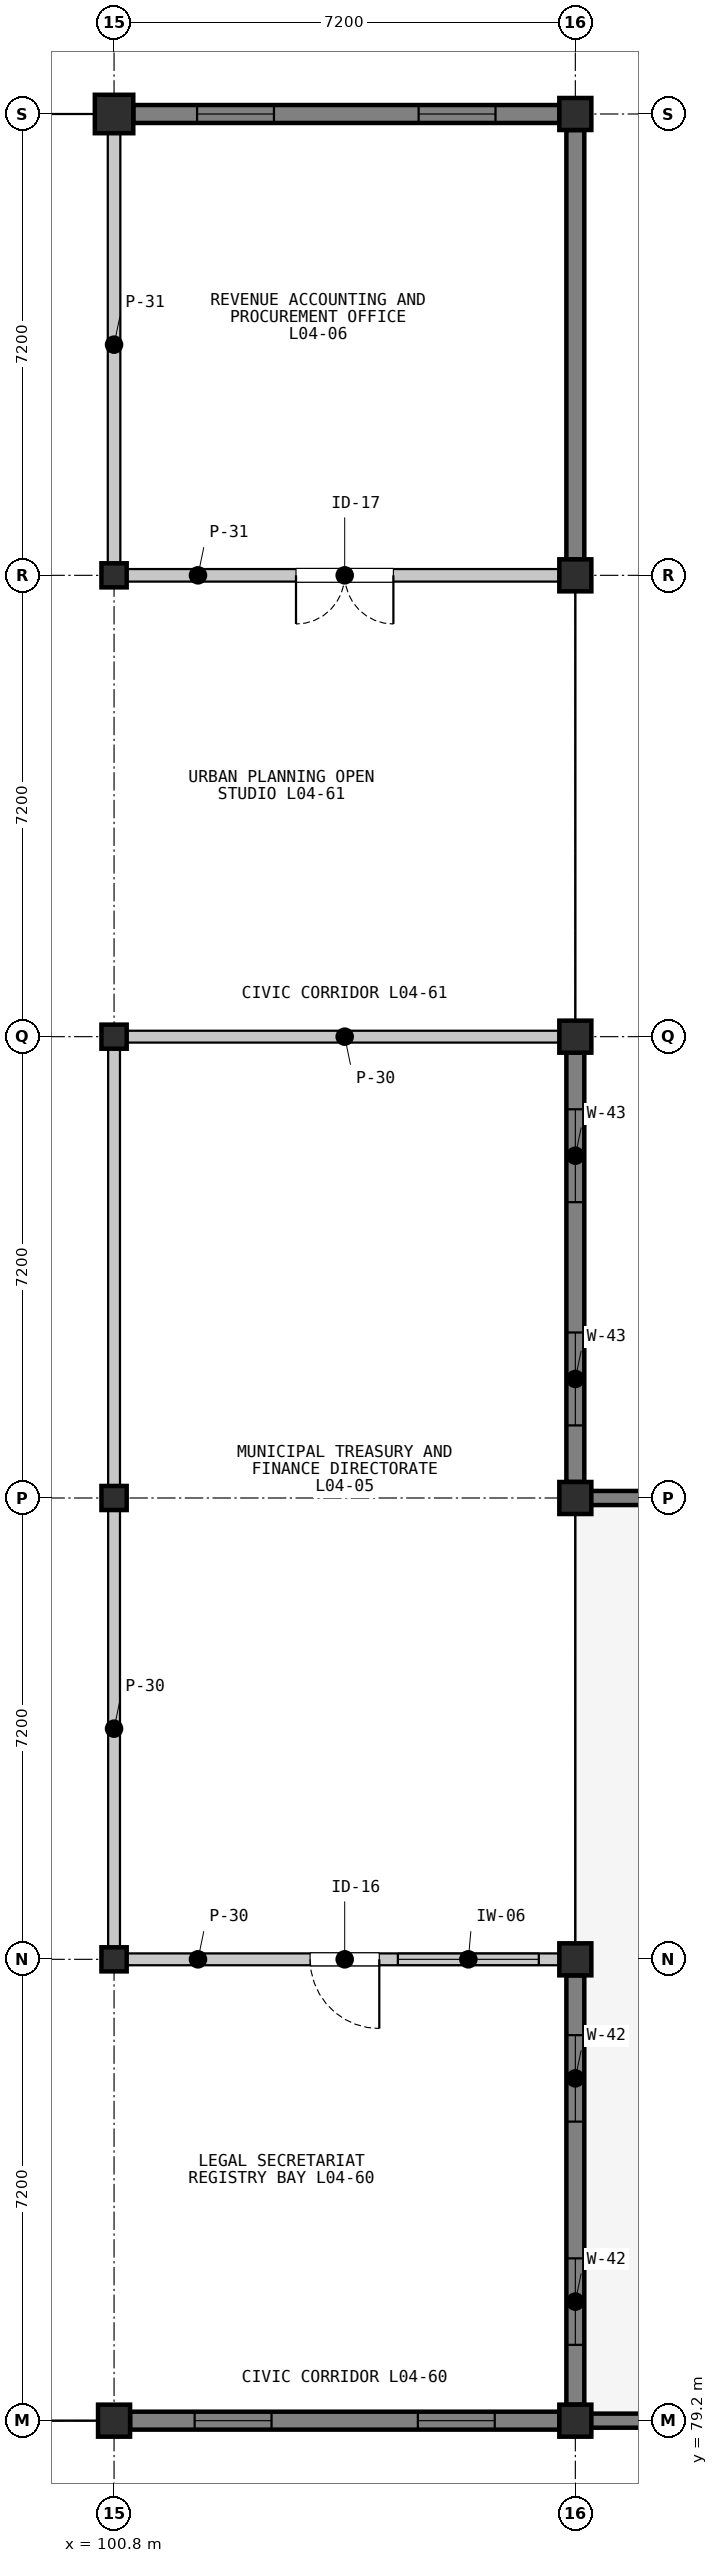
"""IFC4 building model, lengths in metres.
Left out: names, types, materials, properties, quantities, classifications, styles, units other than length and angle.
Written with IfcOpenShell. Run it as: python <this file> out.ifc"""

import sys

from ifc_helpers import new_model, si_unit, direction, frame, frame_2d, origin, origin_2d, place, context, subcontext, project, spatial, rectangle, i_section, extrude, element, fill, save


model = new_model("IFC4")
c1 = context("Model", 3, precision=1e-05, world=origin(), true_north=direction((0.0, 1.0)))
c2 = subcontext(c1, "Body", "Model", "MODEL_VIEW")
j1 = project(units=[si_unit("LENGTHUNIT", "METRE"), si_unit("PLANEANGLEUNIT", "RADIAN")], contexts=[c1])
p1 = place(None, origin())
s1 = spatial("IfcSite", under=j1, at=p1, CompositionType="ELEMENT")
p2 = place(p1, origin())
s2 = spatial("IfcBuilding", under=s1, at=p2, CompositionType="ELEMENT")
p3 = place(p2, frame((0.0, 0.0, 14.1)))
s3 = spatial("IfcBuildingStorey", under=s2, at=p3, CompositionType="ELEMENT", Elevation=14.1)
p4 = place(p3, frame((100.8, 79.2, 0.0), z_axis=(0.0, 0.0, 1.0), x_axis=(1.0, 0.0, 0.0)))
e1 = element("IfcColumn", 1, at=p4, inside=s3, PredefinedType="COLUMN", context=c2, shape_type="SweptSolid", body=[
    extrude(rectangle(XDim=0.5, YDim=0.5, at=origin_2d()), origin(), (0.0, 0.0, 1.0), 3.9),
])
for number, where, z_axis, x_axis in (
    (2, (100.8, 86.4, 0.0), (0.0, 0.0, 1.0), (1.0, 0.0, 0.0)),
    (3, (100.8, 93.6, 0.0), (0.0, 0.0, 1.0), (1.0, 0.0, 0.0)),
    (4, (100.8, 100.8, 0.0), (0.0, 0.0, 1.0), (1.0, 0.0, 0.0)),
    (5, (100.8, 108.0, 0.0), (0.0, 0.0, 1.0), (1.0, 0.0, 0.0)),
):
    element("IfcColumn", number, at=place(p3, frame(where, z_axis=z_axis, x_axis=x_axis)), inside=s3, PredefinedType="COLUMN", context=c2, shape_type="SweptSolid", body=[
        extrude(i_section(OverallWidth=0.394, OverallDepth=0.376, WebThickness=0.017, FlangeThickness=0.028, FilletRadius=0.015, at=origin_2d()), origin(), (0.0, 0.0, 1.0), 3.9),
    ])
p5 = place(p3, frame((100.8, 115.2, 0.0), z_axis=(0.0, 0.0, 1.0), x_axis=(1.0, 0.0, 0.0)))
e6 = element("IfcColumn", 6, at=p5, inside=s3, PredefinedType="COLUMN", context=c2, shape_type="SweptSolid", body=[
    extrude(rectangle(XDim=0.6, YDim=0.6, at=origin_2d()), origin(), (0.0, 0.0, 1.0), 3.9),
])
for number, where, z_axis, x_axis in (
    (7, (108.0, 79.2, 0.0), (0.0, 0.0, 1.0), (1.0, 0.0, 0.0)),
    (8, (108.0, 86.4, 0.0), (0.0, 0.0, 1.0), (1.0, 0.0, 0.0)),
    (9, (108.0, 93.6, 0.0), (0.0, 0.0, 1.0), (1.0, 0.0, 0.0)),
    (10, (108.0, 100.8, 0.0), (0.0, 0.0, 1.0), (1.0, 0.0, 0.0)),
    (11, (108.0, 108.0, 0.0), (0.0, 0.0, 1.0), (1.0, 0.0, 0.0)),
    (12, (108.0, 115.2, 0.0), (0.0, 0.0, 1.0), (1.0, 0.0, 0.0)),
):
    element("IfcColumn", number, at=place(p3, frame(where, z_axis=z_axis, x_axis=x_axis)), inside=s3, PredefinedType="COLUMN", context=c2, shape_type="SweptSolid", body=[
        extrude(rectangle(XDim=0.5, YDim=0.5, at=origin_2d()), origin(), (0.0, 0.0, 1.0), 3.9),
    ])
p6 = place(p3, frame((107.75, 79.2, 0.0), z_axis=(0.0, 0.0, 1.0), x_axis=(-1.0, 0.0, 0.0)))
e13 = element("IfcWall", 13, at=p6, inside=s3, PredefinedType="SOLIDWALL", context=c2, shape_type="SweptSolid", body=[
    extrude(rectangle(XDim=6.7, YDim=0.28, at=frame_2d((3.35, 0.0))), origin(), (0.0, 0.0, 1.0), 3.098),
])
p7 = place(p6, frame((1.008, 0.0, 0.95)))
e14 = element("IfcOpeningElement", 14, at=p7, cuts=e13, PredefinedType="OPENING", context=c2, shape_type="SweptSolid", body=[
    extrude(rectangle(XDim=1.2, YDim=1.7, at=frame_2d((0.6, 0.85))), frame((0.0, 0.15, 0.0), z_axis=(0.0, -1.0, 0.0), x_axis=(1.0, 0.0, 0.0)), (0.0, 0.0, 1.0), 0.3),
])
p8 = place(p6, frame((4.492, 0.0, 0.95)))
e15 = element("IfcOpeningElement", 15, at=p8, cuts=e13, PredefinedType="OPENING", context=c2, shape_type="SweptSolid", body=[
    extrude(rectangle(XDim=1.2, YDim=1.7, at=frame_2d((0.6, 0.85))), frame((0.0, 0.15, 0.0), z_axis=(0.0, -1.0, 0.0), x_axis=(1.0, 0.0, 0.0)), (0.0, 0.0, 1.0), 0.3),
])
p9 = place(p3, frame((108.0, 86.15, 0.0), z_axis=(0.0, 0.0, 1.0), x_axis=(0.0, -1.0, 0.0)))
e16 = element("IfcWall", 16, at=p9, inside=s3, PredefinedType="SOLIDWALL", context=c2, shape_type="SweptSolid", body=[
    extrude(rectangle(XDim=6.7, YDim=0.28, at=frame_2d((3.35, 0.0))), origin(), (0.0, 0.0, 1.0), 3.172),
])
p10 = place(p9, frame((0.933, 0.0, 0.95)))
e17 = element("IfcOpeningElement", 17, at=p10, cuts=e16, PredefinedType="OPENING", context=c2, shape_type="SweptSolid", body=[
    extrude(rectangle(XDim=1.35, YDim=1.85, at=frame_2d((0.675, 0.925))), frame((0.0, 0.15, 0.0), z_axis=(0.0, -1.0, 0.0), x_axis=(1.0, 0.0, 0.0)), (0.0, 0.0, 1.0), 0.3),
])
p11 = place(p9, frame((4.417, 0.0, 0.95)))
e18 = element("IfcOpeningElement", 18, at=p11, cuts=e16, PredefinedType="OPENING", context=c2, shape_type="SweptSolid", body=[
    extrude(rectangle(XDim=1.35, YDim=1.85, at=frame_2d((0.675, 0.925))), frame((0.0, 0.15, 0.0), z_axis=(0.0, -1.0, 0.0), x_axis=(1.0, 0.0, 0.0)), (0.0, 0.0, 1.0), 0.3),
])
p12 = place(p3, frame((108.0, 100.55, 0.0), z_axis=(0.0, 0.0, 1.0), x_axis=(0.0, -1.0, 0.0)))
e19 = element("IfcWall", 19, at=p12, inside=s3, PredefinedType="SOLIDWALL", context=c2, shape_type="SweptSolid", body=[
    extrude(rectangle(XDim=6.7, YDim=0.28, at=frame_2d((3.35, 0.0))), origin(), (0.0, 0.0, 1.0), 3.172),
])
p13 = place(p12, frame((0.883, 0.0, 0.95)))
e20 = element("IfcOpeningElement", 20, at=p13, cuts=e19, PredefinedType="OPENING", context=c2, shape_type="SweptSolid", body=[
    extrude(rectangle(XDim=1.45, YDim=1.85, at=frame_2d((0.725, 0.925))), frame((0.0, 0.15, 0.0), z_axis=(0.0, -1.0, 0.0), x_axis=(1.0, 0.0, 0.0)), (0.0, 0.0, 1.0), 0.3),
])
p14 = place(p12, frame((4.367, 0.0, 0.95)))
e21 = element("IfcOpeningElement", 21, at=p14, cuts=e19, PredefinedType="OPENING", context=c2, shape_type="SweptSolid", body=[
    extrude(rectangle(XDim=1.45, YDim=1.85, at=frame_2d((0.725, 0.925))), frame((0.0, 0.15, 0.0), z_axis=(0.0, -1.0, 0.0), x_axis=(1.0, 0.0, 0.0)), (0.0, 0.0, 1.0), 0.3),
])
p15 = place(p3, frame((101.1, 115.2, 0.0), z_axis=(0.0, 0.0, 1.0), x_axis=(1.0, 0.0, 0.0)))
e22 = element("IfcWall", 22, at=p15, inside=s3, PredefinedType="SOLIDWALL", context=c2, shape_type="SweptSolid", body=[
    extrude(rectangle(XDim=6.65, YDim=0.28, at=frame_2d((3.325, 0.0))), origin(), (0.0, 0.0, 1.0), 3.098),
])
p16 = place(p15, frame((0.996, 0.0, 0.95)))
e23 = element("IfcOpeningElement", 23, at=p16, cuts=e22, PredefinedType="OPENING", context=c2, shape_type="SweptSolid", body=[
    extrude(rectangle(XDim=1.2, YDim=1.7, at=frame_2d((0.6, 0.85))), frame((0.0, 0.15, 0.0), z_axis=(0.0, -1.0, 0.0), x_axis=(1.0, 0.0, 0.0)), (0.0, 0.0, 1.0), 0.3),
])
p17 = place(p15, frame((4.454, 0.0, 0.95)))
e24 = element("IfcOpeningElement", 24, at=p17, cuts=e22, PredefinedType="OPENING", context=c2, shape_type="SweptSolid", body=[
    extrude(rectangle(XDim=1.2, YDim=1.7, at=frame_2d((0.6, 0.85))), frame((0.0, 0.15, 0.0), z_axis=(0.0, -1.0, 0.0), x_axis=(1.0, 0.0, 0.0)), (0.0, 0.0, 1.0), 0.3),
])
p18 = place(p3, frame((108.0, 114.95, 0.0), z_axis=(0.0, 0.0, 1.0), x_axis=(0.0, -1.0, 0.0)))
e25 = element("IfcWall", 25, at=p18, inside=s3, PredefinedType="SOLIDWALL", context=c2, shape_type="SweptSolid", body=[
    extrude(rectangle(XDim=6.7, YDim=0.28, at=frame_2d((3.35, 0.0))), origin(), (0.0, 0.0, 1.0), 3.172),
])
for number, where, z_axis, x_axis in (
    (26, (115.05, 79.2, 0.0), (0.0, 0.0, 1.0), (-1.0, 0.0, 0.0)),
    (27, (108.15, 93.6, 0.0), (0.0, 0.0, 1.0), (1.0, 0.0, 0.0)),
):
    element("IfcWall", number, at=place(p3, frame(where, z_axis=z_axis, x_axis=x_axis)), inside=s3, PredefinedType="PARAPET", context=c2, shape_type="SweptSolid", body=[
        extrude(rectangle(XDim=6.9, YDim=0.22, at=frame_2d((3.45, 0.0))), origin(), (0.0, 0.0, 1.0), 0.85),
    ])
p19 = place(p3, frame((107.88, 86.4, 0.0), z_axis=(0.0, 0.0, 1.0), x_axis=(-1.0, 0.0, 0.0)))
e28 = element("IfcWall", 28, at=p19, inside=s3, PredefinedType="PARTITIONING", context=c2, shape_type="SweptSolid", body=[
    extrude(rectangle(XDim=6.96, YDim=0.185, at=frame_2d((3.48, 0.0))), origin(), (0.0, 0.0, 1.0), 3.088),
])
p20 = place(p19, frame((2.94, 0.0, 0.0)))
e29 = element("IfcOpeningElement", 29, at=p20, cuts=e28, PredefinedType="OPENING", context=c2, shape_type="SweptSolid", body=[
    extrude(rectangle(XDim=1.08, YDim=2.2, at=frame_2d((0.54, 1.1))), frame((0.0, 0.103, 0.0), z_axis=(0.0, -1.0, 0.0), x_axis=(1.0, 0.0, 0.0)), (0.0, 0.0, 1.0), 0.205),
])
p21 = place(p19, frame((0.45, 0.0, 1.05)))
e30 = element("IfcOpeningElement", 30, at=p21, cuts=e28, PredefinedType="OPENING", context=c2, shape_type="SweptSolid", body=[
    extrude(rectangle(XDim=2.2, YDim=1.25, at=frame_2d((1.1, 0.625))), frame((0.0, 0.103, 0.0), z_axis=(0.0, -1.0, 0.0), x_axis=(1.0, 0.0, 0.0)), (0.0, 0.0, 1.0), 0.205),
])
for number, where, z_axis, x_axis in (
    (31, (100.92, 100.8, 0.0), (0.0, 0.0, 1.0), (1.0, 0.0, 0.0)),
    (32, (100.8, 86.52, 0.0), (0.0, 0.0, 1.0), (0.0, 1.0, 0.0)),
    (33, (100.8, 93.72, 0.0), (0.0, 0.0, 1.0), (0.0, 1.0, 0.0)),
):
    element("IfcWall", number, at=place(p3, frame(where, z_axis=z_axis, x_axis=x_axis)), inside=s3, PredefinedType="PARTITIONING", context=c2, shape_type="SweptSolid", body=[
        extrude(rectangle(XDim=6.96, YDim=0.185, at=frame_2d((3.48, 0.0))), origin(), (0.0, 0.0, 1.0), 3.088),
    ])
p22 = place(p3, frame((107.88, 108.0, 0.0), z_axis=(0.0, 0.0, 1.0), x_axis=(-1.0, 0.0, 0.0)))
e34 = element("IfcWall", 34, at=p22, inside=s3, PredefinedType="PARTITIONING", context=c2, shape_type="SweptSolid", body=[
    extrude(rectangle(XDim=6.96, YDim=0.196, at=frame_2d((3.48, 0.0))), origin(), (0.0, 0.0, 1.0), 3.088),
])
p23 = place(p22, frame((2.72, 0.0, 0.0)))
e35 = element("IfcOpeningElement", 35, at=p23, cuts=e34, PredefinedType="OPENING", context=c2, shape_type="SweptSolid", body=[
    extrude(rectangle(XDim=1.52, YDim=2.4, at=frame_2d((0.76, 1.2))), frame((0.0, 0.108, 0.0), z_axis=(0.0, -1.0, 0.0), x_axis=(1.0, 0.0, 0.0)), (0.0, 0.0, 1.0), 0.216),
])
p24 = place(p3, frame((100.8, 108.12, 0.0), z_axis=(0.0, 0.0, 1.0), x_axis=(0.0, 1.0, 0.0)))
e36 = element("IfcWall", 36, at=p24, inside=s3, PredefinedType="PARTITIONING", context=c2, shape_type="SweptSolid", body=[
    extrude(rectangle(XDim=6.96, YDim=0.196, at=frame_2d((3.48, 0.0))), origin(), (0.0, 0.0, 1.0), 3.088),
])
p25 = place(p7, origin())
e37 = element("IfcWindow", 37, at=p25, inside=s3, PartitioningType="SINGLE_PANEL", PredefinedType="WINDOW", context=c2, shape_type="SweptSolid", body=[
    extrude(rectangle(XDim=1.2, YDim=1.7, at=frame_2d((0.6, 0.85))), frame((0.0, 0.03, 0.0), z_axis=(0.0, -1.0, 0.0), x_axis=(1.0, 0.0, 0.0)), (0.0, 0.0, 1.0), 0.06),
])
fill(e14, e37)
p26 = place(p8, origin())
e38 = element("IfcWindow", 38, at=p26, inside=s3, PartitioningType="SINGLE_PANEL", PredefinedType="WINDOW", context=c2, shape_type="SweptSolid", body=[
    extrude(rectangle(XDim=1.2, YDim=1.7, at=frame_2d((0.6, 0.85))), frame((0.0, 0.03, 0.0), z_axis=(0.0, -1.0, 0.0), x_axis=(1.0, 0.0, 0.0)), (0.0, 0.0, 1.0), 0.06),
])
fill(e15, e38)
p27 = place(p10, origin())
e39 = element("IfcWindow", 39, at=p27, inside=s3, PartitioningType="SINGLE_PANEL", PredefinedType="WINDOW", context=c2, shape_type="SweptSolid", body=[
    extrude(rectangle(XDim=1.35, YDim=1.85, at=frame_2d((0.675, 0.925))), frame((0.0, 0.03, 0.0), z_axis=(0.0, -1.0, 0.0), x_axis=(1.0, 0.0, 0.0)), (0.0, 0.0, 1.0), 0.06),
])
fill(e17, e39)
p28 = place(p11, origin())
e40 = element("IfcWindow", 40, at=p28, inside=s3, PartitioningType="SINGLE_PANEL", PredefinedType="WINDOW", context=c2, shape_type="SweptSolid", body=[
    extrude(rectangle(XDim=1.35, YDim=1.85, at=frame_2d((0.675, 0.925))), frame((0.0, 0.03, 0.0), z_axis=(0.0, -1.0, 0.0), x_axis=(1.0, 0.0, 0.0)), (0.0, 0.0, 1.0), 0.06),
])
fill(e18, e40)
p29 = place(p13, origin())
e41 = element("IfcWindow", 41, at=p29, inside=s3, PartitioningType="SINGLE_PANEL", PredefinedType="WINDOW", context=c2, shape_type="SweptSolid", body=[
    extrude(rectangle(XDim=1.45, YDim=1.85, at=frame_2d((0.725, 0.925))), frame((0.0, 0.03, 0.0), z_axis=(0.0, -1.0, 0.0), x_axis=(1.0, 0.0, 0.0)), (0.0, 0.0, 1.0), 0.06),
])
fill(e20, e41)
p30 = place(p14, origin())
e42 = element("IfcWindow", 42, at=p30, inside=s3, PartitioningType="SINGLE_PANEL", PredefinedType="WINDOW", context=c2, shape_type="SweptSolid", body=[
    extrude(rectangle(XDim=1.45, YDim=1.85, at=frame_2d((0.725, 0.925))), frame((0.0, 0.03, 0.0), z_axis=(0.0, -1.0, 0.0), x_axis=(1.0, 0.0, 0.0)), (0.0, 0.0, 1.0), 0.06),
])
fill(e21, e42)
p31 = place(p16, origin())
e43 = element("IfcWindow", 43, at=p31, inside=s3, PartitioningType="SINGLE_PANEL", PredefinedType="WINDOW", context=c2, shape_type="SweptSolid", body=[
    extrude(rectangle(XDim=1.2, YDim=1.7, at=frame_2d((0.6, 0.85))), frame((0.0, 0.03, 0.0), z_axis=(0.0, -1.0, 0.0), x_axis=(1.0, 0.0, 0.0)), (0.0, 0.0, 1.0), 0.06),
])
fill(e23, e43)
p32 = place(p17, origin())
e44 = element("IfcWindow", 44, at=p32, inside=s3, PartitioningType="SINGLE_PANEL", PredefinedType="WINDOW", context=c2, shape_type="SweptSolid", body=[
    extrude(rectangle(XDim=1.2, YDim=1.7, at=frame_2d((0.6, 0.85))), frame((0.0, 0.03, 0.0), z_axis=(0.0, -1.0, 0.0), x_axis=(1.0, 0.0, 0.0)), (0.0, 0.0, 1.0), 0.06),
])
fill(e24, e44)
p33 = place(p20, origin())
e45 = element("IfcDoor", 45, at=p33, inside=s3, OperationType="SINGLE_SWING_LEFT", PredefinedType="DOOR", context=c2, shape_type="SweptSolid", body=[
    extrude(rectangle(XDim=1.08, YDim=2.2, at=frame_2d((0.54, 1.1))), frame((0.0, 0.025, 0.0), z_axis=(0.0, -1.0, 0.0), x_axis=(1.0, 0.0, 0.0)), (0.0, 0.0, 1.0), 0.05),
])
fill(e29, e45)
p34 = place(p21, origin())
e46 = element("IfcWindow", 46, at=p34, inside=s3, PartitioningType="SINGLE_PANEL", PredefinedType="WINDOW", context=c2, shape_type="SweptSolid", body=[
    extrude(rectangle(XDim=2.2, YDim=1.25, at=frame_2d((1.1, 0.625))), frame((0.0, 0.03, 0.0), z_axis=(0.0, -1.0, 0.0), x_axis=(1.0, 0.0, 0.0)), (0.0, 0.0, 1.0), 0.06),
])
fill(e30, e46)
p35 = place(p23, origin())
e47 = element("IfcDoor", 47, at=p35, inside=s3, OperationType="DOUBLE_DOOR_SINGLE_SWING", PredefinedType="DOOR", context=c2, shape_type="SweptSolid", body=[
    extrude(rectangle(XDim=1.52, YDim=2.4, at=frame_2d((0.76, 1.2))), frame((0.0, 0.025, 0.0), z_axis=(0.0, -1.0, 0.0), x_axis=(1.0, 0.0, 0.0)), (0.0, 0.0, 1.0), 0.05),
])
fill(e35, e47)
save(model, sys.argv[1])
